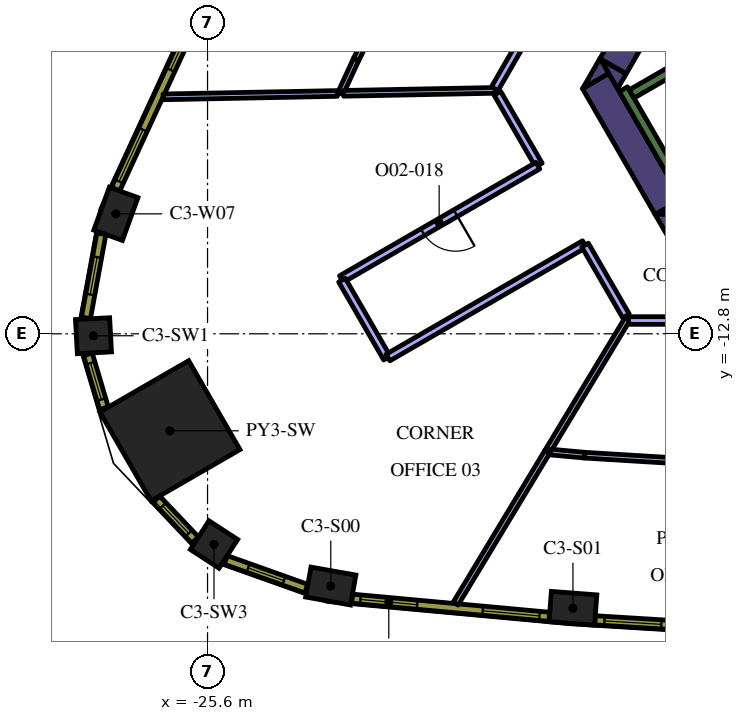
"""IFC4 building model, lengths in metres.
Left out: names, types, materials, properties, quantities, classifications, styles, units other than length and angle.
Written with IfcOpenShell. Run it as: python <this file> out.ifc"""

import sys

from ifc_helpers import new_model, si_unit, direction, frame, frame_2d, origin, origin_2d, place, context, subcontext, project, spatial, polyline, rectangle, outline, extrude, element, fill, save


model = new_model("IFC4")
c1 = context("Model", 3, precision=1e-05, world=origin(), true_north=direction((0.0, 1.0)))
c2 = subcontext(c1, "Body", "Model", "MODEL_VIEW")
j1 = project(units=[si_unit("LENGTHUNIT", "METRE"), si_unit("PLANEANGLEUNIT", "RADIAN")], contexts=[c1])
p1 = place(None, origin())
s1 = spatial("IfcSite", under=j1, at=p1, CompositionType="ELEMENT")
p2 = place(p1, origin())
s2 = spatial("IfcBuilding", under=s1, at=p2, CompositionType="ELEMENT")
p3 = place(p2, frame((0.0, 0.0, 154.2)))
s3 = spatial("IfcBuildingStorey", under=s2, at=p3, CompositionType="ELEMENT", Elevation=154.2)
p4 = place(p3, frame((-26.591, -15.352, 0.0), z_axis=(0.0, 0.0, 1.0), x_axis=(-0.866025403784, -0.5, 0.0)))
e1 = element("IfcColumn", 1, at=p4, inside=s3, PredefinedType="COLUMN", context=c2, shape_type="SweptSolid", body=[
    extrude(rectangle(XDim=2.7, YDim=2.7, at=origin_2d()), origin(), (0.0, 0.0, 1.0), 4.2),
])
for number, where, z_axis, x_axis in (
    (2, (-22.357, -19.437, 0.0), (0.0, 0.0, 1.0), (0.985, -0.175, 0.0)),
    (3, (-15.985, -20.022, 0.0), (0.0, 0.0, 1.0), (0.997, -0.076, 0.0)),
    (4, (-28.012, -9.644, 0.0), (0.0, 0.0, 1.0), (-0.341, -0.94, 0.0)),
):
    element("IfcColumn", number, at=place(p3, frame(where, z_axis=z_axis, x_axis=x_axis)), inside=s3, PredefinedType="COLUMN", context=c2, shape_type="SweptSolid", body=[
        extrude(rectangle(XDim=1.2, YDim=0.8, at=origin_2d()), origin(), (0.0, 0.0, 1.0), 4.2),
    ])
for number, where, z_axis, x_axis in (
    (5, (-28.601, -12.851, 0.0), (0.0, 0.0, 1.0), (0.053, -0.999, 0.0)),
    (6, (-25.43, -18.344, 0.0), (0.0, 0.0, 1.0), (0.838, -0.546, 0.0)),
):
    element("IfcColumn", number, at=place(p3, frame(where, z_axis=z_axis, x_axis=x_axis)), inside=s3, PredefinedType="COLUMN", context=c2, shape_type="SweptSolid", body=[
        extrude(rectangle(XDim=0.9, YDim=0.9, at=origin_2d()), origin(), (0.0, 0.0, 1.0), 4.2),
    ])
p5 = place(p3, origin())
e7 = element("IfcWall", 7, at=p5, inside=s3, PredefinedType="SOLIDWALL", context=c2, shape_type="SweptSolid", body=[
    extrude(outline(polyline([(-13.828, -9.65), (-13.38, -9.65), (-13.38, -10.426), (-13.828, -9.65)])), origin(), (0.0, 0.0, 1.0), 4.2),
])
p6 = place(p3, frame((-15.387, -6.148, 0.0), z_axis=(0.0, 0.0, 1.0), x_axis=(0.499984020225, -0.866034629516, 0.0)))
e8 = element("IfcWall", 8, at=p6, inside=s3, PredefinedType="SOLIDWALL", context=c2, shape_type="SweptSolid", body=[
    extrude(rectangle(XDim=3.824, YDim=0.8, at=frame_2d((1.912, 0.0))), origin(), (0.0, 0.0, 1.0), 4.2),
])
e9 = element("IfcWall", 9, at=p5, inside=s3, PredefinedType="SOLIDWALL", context=c2, shape_type="SweptSolid", body=[
    extrude(outline(polyline([(-15.042, -5.947), (-15.729, -6.343), (-15.271, -5.55), (-15.042, -5.947)])), origin(), (0.0, 0.0, 1.0), 4.2),
])
e10 = element("IfcWall", 10, at=p5, inside=s3, PredefinedType="SOLIDWALL", context=c2, shape_type="SweptSolid", body=[
    extrude(outline(polyline([(-12.904, -9.65), (-13.8, -9.65), (-13.128, -9.262), (-12.904, -9.65)])), origin(), (0.0, 0.0, 1.0), 4.2),
])
p7 = place(p3, frame((-13.518, -3.314, 0.0), z_axis=(0.0, 0.0, 1.0), x_axis=(-0.499969377405, -0.866043083026, 0.0)))
e11 = element("IfcWall", 11, at=p7, inside=s3, PredefinedType="SOLIDWALL", context=c2, shape_type="SweptSolid", body=[
    extrude(rectangle(XDim=2.824, YDim=0.8, at=frame_2d((1.412, 0.0))), origin(), (0.0, 0.0, 1.0), 4.2),
])
e12 = element("IfcWall", 12, at=p5, inside=s3, PredefinedType="SOLIDWALL", context=c2, shape_type="SweptSolid", body=[
    extrude(outline(polyline([(-14.809, -6.35), (-15.257, -5.574), (-14.585, -5.962), (-14.809, -6.35)])), origin(), (0.0, 0.0, 1.0), 4.2),
])
p8 = place(p3, frame((-12.84, -9.511, 0.0), z_axis=(0.0, 0.0, 1.0), x_axis=(-0.499997733992, 0.866026712061, 0.0)))
e13 = element("IfcWall", 13, at=p8, inside=s3, PredefinedType="SOLIDWALL", context=c2, shape_type="SweptSolid", body=[
    extrude(rectangle(XDim=3.634, YDim=0.25, at=frame_2d((1.817, 0.0))), origin(), (0.0, 0.0, 1.0), 4.2),
])
p9 = place(p3, frame((-14.44, -6.49, 0.0), z_axis=(0.0, 0.0, 1.0), x_axis=(0.866022966069, 0.500004222222, 0.0)))
e14 = element("IfcWall", 14, at=p9, inside=s3, PredefinedType="SOLIDWALL", context=c2, shape_type="SweptSolid", body=[
    extrude(rectangle(XDim=6.8, YDim=0.25, at=frame_2d((3.4, 0.0))), origin(), (0.0, 0.0, 1.0), 4.2),
])
p10 = place(p3, frame((-21.689, -5.579, 0.0), z_axis=(0.0, 0.0, 1.0), x_axis=(0.446219729364, 0.894923434225, 0.0)))
e15 = element("IfcWall", 15, at=p10, inside=s3, PredefinedType="PARTITIONING", context=c2, shape_type="SweptSolid", body=[
    extrude(rectangle(XDim=5.995, YDim=0.15, at=frame_2d((2.998, 0.0))), origin(), (0.0, 0.0, 1.0), 3.15),
])
p11 = place(p10, frame((2.595, 0.0, 0.0)))
e16 = element("IfcOpeningElement", 16, at=p11, cuts=e15, PredefinedType="OPENING", context=c2, shape_type="SweptSolid", body=[
    extrude(rectangle(XDim=0.9, YDim=2.1, at=frame_2d((0.45, 1.05))), frame((0.0, 0.085, 0.0), z_axis=(0.0, -1.0, 0.0), x_axis=(1.0, 0.0, 0.0)), (0.0, 0.0, 1.0), 0.17),
])
p12 = place(p3, frame((-21.689, -5.579, 0.0), z_axis=(0.0, 0.0, 1.0), x_axis=(-0.418649696334, -0.908147802816, 0.0)))
e17 = element("IfcWall", 17, at=p12, inside=s3, PredefinedType="PARTITIONING", context=c2, shape_type="SweptSolid", body=[
    extrude(rectangle(XDim=0.986, YDim=0.15, at=frame_2d((0.493, 0.0))), origin(), (0.0, 0.0, 1.0), 3.15),
])
p13 = place(p3, frame((-22.185, -6.476, 0.0), z_axis=(0.0, 0.0, 1.0), x_axis=(-0.999810025733, -0.019491342784, 0.0)))
e18 = element("IfcWall", 18, at=p13, inside=s3, PredefinedType="PARTITIONING", context=c2, shape_type="SweptSolid", body=[
    extrude(rectangle(XDim=4.584, YDim=0.15, at=frame_2d((2.292, 0.0))), origin(), (0.0, 0.0, 1.0), 3.15),
])
p14 = place(p3, frame((-18.016, -6.395, 0.0), z_axis=(0.0, 0.0, 1.0), x_axis=(-0.999809528944, -0.019516808959, 0.0)))
e19 = element("IfcWall", 19, at=p14, inside=s3, PredefinedType="PARTITIONING", context=c2, shape_type="SweptSolid", body=[
    extrude(rectangle(XDim=4.003, YDim=0.15, at=frame_2d((2.001, 0.0))), origin(), (0.0, 0.0, 1.0), 3.15),
])
p15 = place(p3, frame((-13.047, 2.302, 0.0), z_axis=(0.0, 0.0, 1.0), x_axis=(-0.499986873641, -0.866032982159, 0.0)))
e20 = element("IfcWall", 20, at=p15, inside=s3, PredefinedType="PARTITIONING", context=c2, shape_type="SweptSolid", body=[
    extrude(rectangle(XDim=9.99, YDim=0.2, at=frame_2d((4.995, 0.0))), origin(), (0.0, 0.0, 1.0), 3.15),
])
p16 = place(p15, frame((4.5, 0.0, 0.0)))
e21 = element("IfcOpeningElement", 21, at=p16, cuts=e20, PredefinedType="OPENING", context=c2, shape_type="SweptSolid", body=[
    extrude(rectangle(XDim=1.0, YDim=2.1, at=frame_2d((0.5, 1.05))), frame((0.0, 0.11, 0.0), z_axis=(0.0, -1.0, 0.0), x_axis=(1.0, 0.0, 0.0)), (0.0, 0.0, 1.0), 0.22),
])
p17 = place(p3, frame((-16.656, -15.9, 0.0), z_axis=(0.0, 0.0, 1.0), x_axis=(-0.516845255261, -0.856078841062, 0.0)))
e22 = element("IfcWall", 22, at=p17, inside=s3, PredefinedType="PARTITIONING", context=c2, shape_type="SweptSolid", body=[
    extrude(rectangle(XDim=4.672, YDim=0.15, at=frame_2d((2.336, 0.0))), origin(), (0.0, 0.0, 1.0), 3.15),
])
p18 = place(p3, frame((-14.546, -12.406, 0.0), z_axis=(0.0, 0.0, 1.0), x_axis=(-0.516811321583, -0.856099327113, 0.0)))
e23 = element("IfcWall", 23, at=p18, inside=s3, PredefinedType="PARTITIONING", context=c2, shape_type="SweptSolid", body=[
    extrude(rectangle(XDim=4.09, YDim=0.15, at=frame_2d((2.045, 0.0))), origin(), (0.0, 0.0, 1.0), 3.15),
])
p19 = place(p3, frame((-17.974, -6.469, 0.0), z_axis=(0.0, 0.0, 1.0), x_axis=(0.499961062019, -0.866047883471, 0.0)))
e24 = element("IfcWall", 24, at=p19, inside=s3, PredefinedType="PARTITIONING", context=c2, shape_type="SweptSolid", body=[
    extrude(rectangle(XDim=2.185, YDim=0.2, at=frame_2d((1.092, 0.0))), origin(), (0.0, 0.0, 1.0), 3.15),
])
p20 = place(p3, frame((-16.907, -8.376, 0.0), z_axis=(0.0, 0.0, 1.0), x_axis=(-0.866017375886, -0.50001390447, 0.0)))
e25 = element("IfcWall", 25, at=p20, inside=s3, PredefinedType="PARTITIONING", context=c2, shape_type="SweptSolid", body=[
    extrude(rectangle(XDim=5.97, YDim=0.2, at=frame_2d((2.985, 0.0))), origin(), (0.0, 0.0, 1.0), 3.15),
])
p21 = place(p20, frame((2.5, 0.0, 0.0)))
e26 = element("IfcOpeningElement", 26, at=p21, cuts=e25, PredefinedType="OPENING", context=c2, shape_type="SweptSolid", body=[
    extrude(rectangle(XDim=1.0, YDim=2.1, at=frame_2d((0.5, 1.05))), frame((0.0, 0.11, 0.0), z_axis=(0.0, -1.0, 0.0), x_axis=(1.0, 0.0, 0.0)), (0.0, 0.0, 1.0), 0.22),
])
p22 = place(p3, frame((-22.062, -11.387, 0.0), z_axis=(0.0, 0.0, 1.0), x_axis=(0.5000167099, -0.866015756104, 0.0)))
e27 = element("IfcWall", 27, at=p22, inside=s3, PredefinedType="PARTITIONING", context=c2, shape_type="SweptSolid", body=[
    extrude(rectangle(XDim=2.37, YDim=0.2, at=frame_2d((1.185, 0.0))), origin(), (0.0, 0.0, 1.0), 3.15),
])
p23 = place(p3, frame((-20.851, -13.424, 0.0), z_axis=(0.0, 0.0, 1.0), x_axis=(0.866007151214, 0.500031613047, 0.0)))
e28 = element("IfcWall", 28, at=p23, inside=s3, PredefinedType="PARTITIONING", context=c2, shape_type="SweptSolid", body=[
    extrude(rectangle(XDim=5.97, YDim=0.2, at=frame_2d((2.985, 0.0))), origin(), (0.0, 0.0, 1.0), 3.15),
])
p24 = place(p3, frame((-15.666, -10.465, 0.0), z_axis=(0.0, 0.0, 1.0), x_axis=(0.499977443261, -0.866038426532, 0.0)))
e29 = element("IfcWall", 29, at=p24, inside=s3, PredefinedType="PARTITIONING", context=c2, shape_type="SweptSolid", body=[
    extrude(rectangle(XDim=2.155, YDim=0.2, at=frame_2d((1.077, 0.0))), origin(), (0.0, 0.0, 1.0), 3.15),
])
p25 = place(p3, frame((-16.575, -15.911, 0.0), z_axis=(0.0, 0.0, 1.0), x_axis=(0.995808489615, -0.09146284497, 0.0)))
e30 = element("IfcWall", 30, at=p25, inside=s3, PredefinedType="PARTITIONING", context=c2, shape_type="SweptSolid", body=[
    extrude(rectangle(XDim=0.902, YDim=0.15, at=frame_2d((0.451, 0.0))), origin(), (0.0, 0.0, 1.0), 3.15),
])
p26 = place(p3, frame((-9.692, -16.36, 0.0), z_axis=(0.0, 0.0, 1.0), x_axis=(-0.998135339661, 0.061039689709, 0.0)))
e31 = element("IfcWall", 31, at=p26, inside=s3, PredefinedType="PARTITIONING", context=c2, shape_type="SweptSolid", body=[
    extrude(rectangle(XDim=5.996, YDim=0.15, at=frame_2d((2.998, 0.0))), origin(), (0.0, 0.0, 1.0), 3.15),
])
p27 = place(p26, frame((2.595, 0.0, 0.0)))
e32 = element("IfcOpeningElement", 32, at=p27, cuts=e31, PredefinedType="OPENING", context=c2, shape_type="SweptSolid", body=[
    extrude(rectangle(XDim=0.9, YDim=2.1, at=frame_2d((0.45, 1.05))), frame((0.0, 0.085, 0.0), z_axis=(0.0, -1.0, 0.0), x_axis=(1.0, 0.0, 0.0)), (0.0, 0.0, 1.0), 0.17),
])
p28 = place(p3, frame((-14.521, -12.45, 0.0), z_axis=(0.0, 0.0, 1.0), x_axis=(1.0, 0.0, 0.0)))
e33 = element("IfcWall", 33, at=p28, inside=s3, PredefinedType="PARTITIONING", context=c2, shape_type="SweptSolid", body=[
    extrude(rectangle(XDim=9.99, YDim=0.2, at=frame_2d((4.995, 0.0))), origin(), (0.0, 0.0, 1.0), 3.15),
])
p29 = place(p28, frame((4.5, 0.0, 0.0)))
e34 = element("IfcOpeningElement", 34, at=p29, cuts=e33, PredefinedType="OPENING", context=c2, shape_type="SweptSolid", body=[
    extrude(rectangle(XDim=1.0, YDim=2.1, at=frame_2d((0.5, 1.05))), frame((0.0, 0.11, 0.0), z_axis=(0.0, -1.0, 0.0), x_axis=(1.0, 0.0, 0.0)), (0.0, 0.0, 1.0), 0.22),
])
p30 = place(p3, frame((-21.797, -19.77, 0.0), z_axis=(0.0, 0.0, 1.0), x_axis=(0.995808712151, -0.091460422067, 0.0)))
e35 = element("IfcWall", 35, at=p30, inside=s3, PredefinedType="SOLIDWALL", context=c2, shape_type="SweptSolid", body=[
    extrude(rectangle(XDim=5.213, YDim=0.24, at=frame_2d((2.606, 0.0))), origin(), (0.0, 0.0, 1.0), 3.95),
])
p31 = place(p30, frame((0.221, 0.0, 0.9)))
e36 = element("IfcOpeningElement", 36, at=p31, cuts=e35, PredefinedType="OPENING", context=c2, shape_type="SweptSolid", body=[
    extrude(rectangle(XDim=1.5, YDim=2.55, at=frame_2d((0.75, 1.275))), frame((0.0, 0.13, 0.0), z_axis=(0.0, -1.0, 0.0), x_axis=(1.0, 0.0, 0.0)), (0.0, 0.0, 1.0), 0.26),
])
p32 = place(p30, frame((3.452, 0.0, 0.9)))
e37 = element("IfcOpeningElement", 37, at=p32, cuts=e35, PredefinedType="OPENING", context=c2, shape_type="SweptSolid", body=[
    extrude(rectangle(XDim=1.5, YDim=2.55, at=frame_2d((0.75, 1.275))), frame((0.0, 0.13, 0.0), z_axis=(0.0, -1.0, 0.0), x_axis=(1.0, 0.0, 0.0)), (0.0, 0.0, 1.0), 0.26),
])
p33 = place(p3, frame((-15.405, -20.338, 0.0), z_axis=(0.0, 0.0, 1.0), x_axis=(0.998135294646, -0.061040425794, 0.0)))
e38 = element("IfcWall", 38, at=p33, inside=s3, PredefinedType="SOLIDWALL", context=c2, shape_type="SweptSolid", body=[
    extrude(rectangle(XDim=5.204, YDim=0.24, at=frame_2d((2.602, 0.0))), origin(), (0.0, 0.0, 1.0), 3.95),
])
p34 = place(p33, frame((0.248, 0.0, 0.9)))
e39 = element("IfcOpeningElement", 39, at=p34, cuts=e38, PredefinedType="OPENING", context=c2, shape_type="SweptSolid", body=[
    extrude(rectangle(XDim=1.5, YDim=2.55, at=frame_2d((0.75, 1.275))), frame((0.0, 0.13, 0.0), z_axis=(0.0, -1.0, 0.0), x_axis=(1.0, 0.0, 0.0)), (0.0, 0.0, 1.0), 0.26),
])
p35 = place(p33, frame((3.455, 0.0, 0.9)))
e40 = element("IfcOpeningElement", 40, at=p35, cuts=e38, PredefinedType="OPENING", context=c2, shape_type="SweptSolid", body=[
    extrude(rectangle(XDim=1.5, YDim=2.55, at=frame_2d((0.75, 1.275))), frame((0.0, 0.13, 0.0), z_axis=(0.0, -1.0, 0.0), x_axis=(1.0, 0.0, 0.0)), (0.0, 0.0, 1.0), 0.26),
])
p36 = place(p3, frame((-25.837, -4.258, 0.0), z_axis=(0.0, 0.0, 1.0), x_axis=(-0.418722559465, -0.908114209885, 0.0)))
e41 = element("IfcWall", 41, at=p36, inside=s3, PredefinedType="SOLIDWALL", context=c2, shape_type="SweptSolid", body=[
    extrude(rectangle(XDim=5.213, YDim=0.24, at=frame_2d((2.606, 0.0))), origin(), (0.0, 0.0, 1.0), 3.95),
])
p37 = place(p36, frame((0.261, 0.0, 0.9)))
e42 = element("IfcOpeningElement", 42, at=p37, cuts=e41, PredefinedType="OPENING", context=c2, shape_type="SweptSolid", body=[
    extrude(rectangle(XDim=1.5, YDim=2.55, at=frame_2d((0.75, 1.275))), frame((0.0, 0.13, 0.0), z_axis=(0.0, -1.0, 0.0), x_axis=(1.0, 0.0, 0.0)), (0.0, 0.0, 1.0), 0.26),
])
p38 = place(p36, frame((3.492, 0.0, 0.9)))
e43 = element("IfcOpeningElement", 43, at=p38, cuts=e41, PredefinedType="OPENING", context=c2, shape_type="SweptSolid", body=[
    extrude(rectangle(XDim=1.5, YDim=2.55, at=frame_2d((0.75, 1.275))), frame((0.0, 0.13, 0.0), z_axis=(0.0, -1.0, 0.0), x_axis=(1.0, 0.0, 0.0)), (0.0, 0.0, 1.0), 0.26),
])
p39 = place(p3, frame((-28.393, -10.167, 0.0), z_axis=(0.0, 0.0, 1.0), x_axis=(-0.180737189259, -0.983531427265, 0.0)))
e44 = element("IfcWall", 44, at=p39, inside=s3, PredefinedType="SOLIDWALL", context=c2, shape_type="SweptSolid", body=[
    extrude(rectangle(XDim=2.25, YDim=0.24, at=frame_2d((1.125, 0.0))), origin(), (0.0, 0.0, 1.0), 3.95),
])
p40 = place(p39, frame((0.625, 0.0, 0.9)))
e45 = element("IfcOpeningElement", 45, at=p40, cuts=e44, PredefinedType="OPENING", context=c2, shape_type="SweptSolid", body=[
    extrude(rectangle(XDim=1.0, YDim=2.55, at=frame_2d((0.5, 1.275))), frame((0.0, 0.13, 0.0), z_axis=(0.0, -1.0, 0.0), x_axis=(1.0, 0.0, 0.0)), (0.0, 0.0, 1.0), 0.26),
])
p41 = place(p3, frame((-28.748, -13.34, 0.0), z_axis=(0.0, 0.0, 1.0), x_axis=(0.284413721403, -0.958701640281, 0.0)))
e46 = element("IfcWall", 46, at=p41, inside=s3, PredefinedType="SOLIDWALL", context=c2, shape_type="SweptSolid", body=[
    extrude(rectangle(XDim=1.482, YDim=0.24, at=frame_2d((0.741, 0.0))), origin(), (0.0, 0.0, 1.0), 3.95),
])
p42 = place(p41, frame((0.241, 0.0, 0.9)))
e47 = element("IfcOpeningElement", 47, at=p42, cuts=e46, PredefinedType="OPENING", context=c2, shape_type="SweptSolid", body=[
    extrude(rectangle(XDim=1.0, YDim=2.55, at=frame_2d((0.5, 1.275))), frame((0.0, 0.13, 0.0), z_axis=(0.0, -1.0, 0.0), x_axis=(1.0, 0.0, 0.0)), (0.0, 0.0, 1.0), 0.26),
])
p43 = place(p3, frame((-26.946, -17.151, 0.0), z_axis=(0.0, 0.0, 1.0), x_axis=(0.687986858937, -0.725723144133, 0.0)))
e48 = element("IfcWall", 48, at=p43, inside=s3, PredefinedType="SOLIDWALL", context=c2, shape_type="SweptSolid", body=[
    extrude(rectangle(XDim=1.481, YDim=0.24, at=frame_2d((0.741, 0.0))), origin(), (0.0, 0.0, 1.0), 3.95),
])
p44 = place(p43, frame((0.241, 0.0, 0.9)))
e49 = element("IfcOpeningElement", 49, at=p44, cuts=e48, PredefinedType="OPENING", context=c2, shape_type="SweptSolid", body=[
    extrude(rectangle(XDim=1.0, YDim=2.55, at=frame_2d((0.5, 1.275))), frame((0.0, 0.13, 0.0), z_axis=(0.0, -1.0, 0.0), x_axis=(1.0, 0.0, 0.0)), (0.0, 0.0, 1.0), 0.26),
])
p45 = place(p3, frame((-25.121, -18.751, 0.0), z_axis=(0.0, 0.0, 1.0), x_axis=(0.942099727267, -0.335332825539, 0.0)))
e50 = element("IfcWall", 50, at=p45, inside=s3, PredefinedType="SOLIDWALL", context=c2, shape_type="SweptSolid", body=[
    extrude(rectangle(XDim=2.25, YDim=0.24, at=frame_2d((1.125, 0.0))), origin(), (0.0, 0.0, 1.0), 3.95),
])
p46 = place(p45, frame((0.625, 0.0, 0.9)))
e51 = element("IfcOpeningElement", 51, at=p46, cuts=e50, PredefinedType="OPENING", context=c2, shape_type="SweptSolid", body=[
    extrude(rectangle(XDim=1.0, YDim=2.55, at=frame_2d((0.5, 1.275))), frame((0.0, 0.13, 0.0), z_axis=(0.0, -1.0, 0.0), x_axis=(1.0, 0.0, 0.0)), (0.0, 0.0, 1.0), 0.26),
])
p47 = place(p21, origin())
e52 = element("IfcDoor", 52, at=p47, inside=s3, OperationType="SINGLE_SWING_RIGHT", PredefinedType="DOOR", context=c2, shape_type="SweptSolid", body=[
    extrude(rectangle(XDim=1.0, YDim=2.1, at=frame_2d((0.5, 1.05))), frame((0.0, 0.025, 0.0), z_axis=(0.0, -1.0, 0.0), x_axis=(1.0, 0.0, 0.0)), (0.0, 0.0, 1.0), 0.05),
])
fill(e26, e52)
p48 = place(p31, origin())
e53 = element("IfcWindow", 53, at=p48, inside=s3, PartitioningType="SINGLE_PANEL", PredefinedType="WINDOW", context=c2, shape_type="SweptSolid", body=[
    extrude(rectangle(XDim=1.5, YDim=2.55, at=frame_2d((0.75, 1.275))), frame((0.0, 0.04, 0.0), z_axis=(0.0, -1.0, 0.0), x_axis=(1.0, 0.0, 0.0)), (0.0, 0.0, 1.0), 0.06),
])
fill(e36, e53)
p49 = place(p32, origin())
e54 = element("IfcWindow", 54, at=p49, inside=s3, PartitioningType="SINGLE_PANEL", PredefinedType="WINDOW", context=c2, shape_type="SweptSolid", body=[
    extrude(rectangle(XDim=1.5, YDim=2.55, at=frame_2d((0.75, 1.275))), frame((0.0, 0.04, 0.0), z_axis=(0.0, -1.0, 0.0), x_axis=(1.0, 0.0, 0.0)), (0.0, 0.0, 1.0), 0.06),
])
fill(e37, e54)
p50 = place(p34, origin())
e55 = element("IfcWindow", 55, at=p50, inside=s3, PartitioningType="SINGLE_PANEL", PredefinedType="WINDOW", context=c2, shape_type="SweptSolid", body=[
    extrude(rectangle(XDim=1.5, YDim=2.55, at=frame_2d((0.75, 1.275))), frame((0.0, 0.04, 0.0), z_axis=(0.0, -1.0, 0.0), x_axis=(1.0, 0.0, 0.0)), (0.0, 0.0, 1.0), 0.06),
])
fill(e39, e55)
p51 = place(p37, origin())
e56 = element("IfcWindow", 56, at=p51, inside=s3, PartitioningType="SINGLE_PANEL", PredefinedType="WINDOW", context=c2, shape_type="SweptSolid", body=[
    extrude(rectangle(XDim=1.5, YDim=2.55, at=frame_2d((0.75, 1.275))), frame((0.0, 0.04, 0.0), z_axis=(0.0, -1.0, 0.0), x_axis=(1.0, 0.0, 0.0)), (0.0, 0.0, 1.0), 0.06),
])
fill(e42, e56)
p52 = place(p38, origin())
e57 = element("IfcWindow", 57, at=p52, inside=s3, PartitioningType="SINGLE_PANEL", PredefinedType="WINDOW", context=c2, shape_type="SweptSolid", body=[
    extrude(rectangle(XDim=1.5, YDim=2.55, at=frame_2d((0.75, 1.275))), frame((0.0, 0.04, 0.0), z_axis=(0.0, -1.0, 0.0), x_axis=(1.0, 0.0, 0.0)), (0.0, 0.0, 1.0), 0.06),
])
fill(e43, e57)
p53 = place(p40, origin())
e58 = element("IfcWindow", 58, at=p53, inside=s3, PartitioningType="SINGLE_PANEL", PredefinedType="WINDOW", context=c2, shape_type="SweptSolid", body=[
    extrude(rectangle(XDim=1.0, YDim=2.55, at=frame_2d((0.5, 1.275))), frame((0.0, 0.04, 0.0), z_axis=(0.0, -1.0, 0.0), x_axis=(1.0, 0.0, 0.0)), (0.0, 0.0, 1.0), 0.06),
])
fill(e45, e58)
p54 = place(p42, origin())
e59 = element("IfcWindow", 59, at=p54, inside=s3, PartitioningType="SINGLE_PANEL", PredefinedType="WINDOW", context=c2, shape_type="SweptSolid", body=[
    extrude(rectangle(XDim=1.0, YDim=2.55, at=frame_2d((0.5, 1.275))), frame((0.0, 0.04, 0.0), z_axis=(0.0, -1.0, 0.0), x_axis=(1.0, 0.0, 0.0)), (0.0, 0.0, 1.0), 0.06),
])
fill(e47, e59)
p55 = place(p44, origin())
e60 = element("IfcWindow", 60, at=p55, inside=s3, PartitioningType="SINGLE_PANEL", PredefinedType="WINDOW", context=c2, shape_type="SweptSolid", body=[
    extrude(rectangle(XDim=1.0, YDim=2.55, at=frame_2d((0.5, 1.275))), frame((0.0, 0.04, 0.0), z_axis=(0.0, -1.0, 0.0), x_axis=(1.0, 0.0, 0.0)), (0.0, 0.0, 1.0), 0.06),
])
fill(e49, e60)
p56 = place(p46, origin())
e61 = element("IfcWindow", 61, at=p56, inside=s3, PartitioningType="SINGLE_PANEL", PredefinedType="WINDOW", context=c2, shape_type="SweptSolid", body=[
    extrude(rectangle(XDim=1.0, YDim=2.55, at=frame_2d((0.5, 1.275))), frame((0.0, 0.04, 0.0), z_axis=(0.0, -1.0, 0.0), x_axis=(1.0, 0.0, 0.0)), (0.0, 0.0, 1.0), 0.06),
])
fill(e51, e61)
save(model, sys.argv[1])
